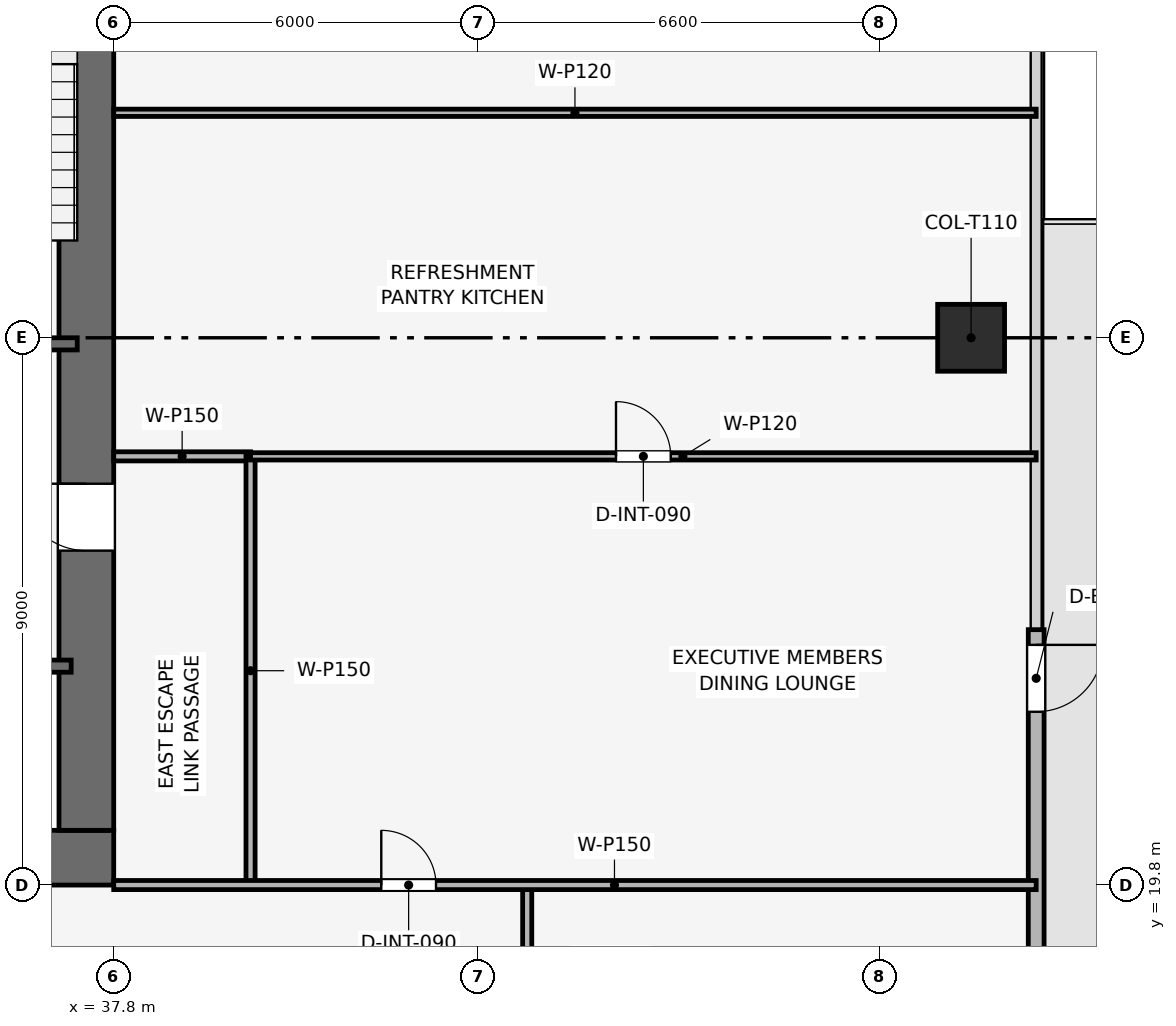
"""IFC4 building model, lengths in metres.
Left out: names, types, materials, properties, quantities, classifications, styles, units other than length and angle.
Written with IfcOpenShell. Run it as: python <this file> out.ifc"""

import sys

from ifc_helpers import new_model, si_unit, direction, frame, frame_2d, origin, origin_2d, place, context, subcontext, project, spatial, rectangle, extrude, element, fill, save


model = new_model("IFC4")
c1 = context("Model", 3, precision=1e-05, world=origin(), true_north=direction((0.0, 1.0)))
c2 = subcontext(c1, "Body", "Model", "MODEL_VIEW")
j1 = project(units=[si_unit("LENGTHUNIT", "METRE"), si_unit("PLANEANGLEUNIT", "RADIAN")], contexts=[c1])
p1 = place(None, origin())
s1 = spatial("IfcSite", under=j1, at=p1, CompositionType="ELEMENT")
p2 = place(p1, origin())
s2 = spatial("IfcBuilding", under=s1, at=p2, CompositionType="ELEMENT")
p3 = place(p2, frame((0.0, 0.0, 149.55)))
s3 = spatial("IfcBuildingStorey", under=s2, at=p3, CompositionType="ELEMENT", Elevation=149.55)
p4 = place(p3, frame((19.8, 20.25, 0.0), z_axis=(0.0, 0.0, 1.0), x_axis=(1.0, 0.0, 0.0)))
e1 = element("IfcWall", 1, at=p4, inside=s3, PredefinedType="SHEAR", context=c2, shape_type="SweptSolid", body=[
    extrude(rectangle(XDim=18.0, YDim=0.9, at=frame_2d((9.0, 0.0))), origin(), (0.0, 0.0, 1.0), 3.75),
])
p5 = place(p4, frame((8.4, 0.0, 0.0)))
e2 = element("IfcOpeningElement", 2, at=p5, cuts=e1, PredefinedType="OPENING", context=c2, shape_type="SweptSolid", body=[
    extrude(rectangle(XDim=1.2, YDim=2.2, at=frame_2d((0.6, 1.1))), frame((0.0, 0.46, 0.0), z_axis=(0.0, -1.0, 0.0), x_axis=(1.0, 0.0, 0.0)), (0.0, 0.0, 1.0), 0.92),
])
p6 = place(p3, frame((37.35, 20.7, 0.0), z_axis=(0.0, 0.0, 1.0), x_axis=(0.0, 1.0, 0.0)))
e3 = element("IfcWall", 3, at=p6, inside=s3, PredefinedType="SHEAR", context=c2, shape_type="SweptSolid", body=[
    extrude(rectangle(XDim=16.2, YDim=0.9, at=frame_2d((8.1, 0.0))), origin(), (0.0, 0.0, 1.0), 3.75),
])
p7 = place(p6, frame((4.6, 0.0, 0.0)))
e4 = element("IfcOpeningElement", 4, at=p7, cuts=e3, PredefinedType="OPENING", context=c2, shape_type="SweptSolid", body=[
    extrude(rectangle(XDim=1.1, YDim=2.15, at=frame_2d((0.55, 1.075))), frame((0.0, 0.46, 0.0), z_axis=(0.0, -1.0, 0.0), x_axis=(1.0, 0.0, 0.0)), (0.0, 0.0, 1.0), 0.92),
])
p8 = place(p3, frame((51.9, 28.8, 0.003), z_axis=(0.0, 0.0, 1.0), x_axis=(1.0, 0.0, 0.0)))
e5 = element("IfcColumn", 5, at=p8, inside=s3, PredefinedType="COLUMN", context=c2, shape_type="SweptSolid", body=[
    extrude(rectangle(XDim=1.1, YDim=1.1, at=origin_2d()), origin(), (0.0, 0.0, 1.0), 3.489),
])
p9 = place(p3, frame((52.97, 24.0, 0.0), z_axis=(0.0, 0.0, 1.0), x_axis=(0.0, -1.0, 0.0)))
e6 = element("IfcWall", 6, at=p9, inside=s3, PredefinedType="SOLIDWALL", context=c2, shape_type="SweptSolid", body=[
    extrude(rectangle(XDim=12.6, YDim=0.26, at=frame_2d((6.3, 0.0))), origin(), (0.0, 0.0, 1.0), 3.495),
])
p10 = place(p9, frame((0.25, 0.0, 0.0)))
e7 = element("IfcOpeningElement", 7, at=p10, cuts=e6, PredefinedType="OPENING", context=c2, shape_type="SweptSolid", body=[
    extrude(rectangle(XDim=1.1, YDim=2.2, at=frame_2d((0.55, 1.1))), frame((0.0, 0.14, 0.0), z_axis=(0.0, -1.0, 0.0), x_axis=(1.0, 0.0, 0.0)), (0.0, 0.0, 1.0), 0.28),
])
p11 = place(p3, frame((34.05, 28.7, 0.0), z_axis=(0.0, 0.0, 1.0), x_axis=(1.0, 0.0, 0.0)))
e8 = element("IfcWall", 8, at=p11, inside=s3, PredefinedType="SHEAR", context=c2, shape_type="SweptSolid", body=[
    extrude(rectangle(XDim=3.15, YDim=0.2, at=frame_2d((1.575, 0.0))), origin(), (0.0, 0.0, 1.0), 3.495),
])
p12 = place(p11, frame((0.8, 0.0, 0.0)))
e9 = element("IfcOpeningElement", 9, at=p12, cuts=e8, PredefinedType="OPENING", context=c2, shape_type="SweptSolid", body=[
    extrude(rectangle(XDim=1.0, YDim=2.1, at=frame_2d((0.5, 1.05))), frame((0.0, 0.11, 0.0), z_axis=(0.0, -1.0, 0.0), x_axis=(1.0, 0.0, 0.0)), (0.0, 0.0, 1.0), 0.22),
])
p13 = place(p3, frame((34.05, 23.4, 0.0), z_axis=(0.0, 0.0, 1.0), x_axis=(1.0, 0.0, 0.0)))
e10 = element("IfcWall", 10, at=p13, inside=s3, PredefinedType="SHEAR", context=c2, shape_type="SweptSolid", body=[
    extrude(rectangle(XDim=3.05, YDim=0.2, at=frame_2d((1.525, 0.0))), origin(), (0.0, 0.0, 1.0), 3.495),
])
p14 = place(p13, frame((1.2, 0.0, 0.0)))
e11 = element("IfcOpeningElement", 11, at=p14, cuts=e10, PredefinedType="OPENING", context=c2, shape_type="SweptSolid", body=[
    extrude(rectangle(XDim=1.1, YDim=2.15, at=frame_2d((0.55, 1.075))), frame((0.0, 0.11, 0.0), z_axis=(0.0, -1.0, 0.0), x_axis=(1.0, 0.0, 0.0)), (0.0, 0.0, 1.0), 0.22),
])
p15 = place(p3, frame((37.8, 26.85, 0.0), z_axis=(0.0, 0.0, 1.0), x_axis=(1.0, 0.0, 0.0)))
e12 = element("IfcWall", 12, at=p15, inside=s3, PredefinedType="PARTITIONING", context=c2, shape_type="SweptSolid", body=[
    extrude(rectangle(XDim=2.25, YDim=0.15, at=frame_2d((1.125, 0.0))), origin(), (0.0, 0.0, 1.0), 3.495),
])
p16 = place(p3, frame((40.05, 19.8, 0.0), z_axis=(0.0, 0.0, 1.0), x_axis=(0.0, 1.0, 0.0)))
e13 = element("IfcWall", 13, at=p16, inside=s3, PredefinedType="PARTITIONING", context=c2, shape_type="SweptSolid", body=[
    extrude(rectangle(XDim=7.05, YDim=0.15, at=frame_2d((3.525, 0.0))), origin(), (0.0, 0.0, 1.0), 3.03),
])
p17 = place(p3, frame((40.05, 26.85, 0.0), z_axis=(0.0, 0.0, 1.0), x_axis=(1.0, 0.0, 0.0)))
e14 = element("IfcWall", 14, at=p17, inside=s3, PredefinedType="PARTITIONING", context=c2, shape_type="SweptSolid", body=[
    extrude(rectangle(XDim=12.92, YDim=0.12, at=frame_2d((6.46, 0.0))), origin(), (0.0, 0.0, 1.0), 2.98),
])
p18 = place(p17, frame((6.01, 0.0, 0.0)))
e15 = element("IfcOpeningElement", 15, at=p18, cuts=e14, PredefinedType="OPENING", context=c2, shape_type="SweptSolid", body=[
    extrude(rectangle(XDim=0.9, YDim=2.1, at=frame_2d((0.45, 1.05))), frame((0.0, 0.07, 0.0), z_axis=(0.0, -1.0, 0.0), x_axis=(1.0, 0.0, 0.0)), (0.0, 0.0, 1.0), 0.14),
])
p19 = place(p3, frame((37.8, 32.5, 0.0), z_axis=(0.0, 0.0, 1.0), x_axis=(1.0, 0.0, 0.0)))
e16 = element("IfcWall", 16, at=p19, inside=s3, PredefinedType="PARTITIONING", context=c2, shape_type="SweptSolid", body=[
    extrude(rectangle(XDim=15.17, YDim=0.12, at=frame_2d((7.585, 0.0))), origin(), (0.0, 0.0, 1.0), 2.98),
])
p20 = place(p3, frame((44.6, 17.4, 0.0), z_axis=(0.0, 0.0, 1.0), x_axis=(0.0, 1.0, 0.0)))
e17 = element("IfcWall", 17, at=p20, inside=s3, PredefinedType="PARTITIONING", context=c2, shape_type="SweptSolid", body=[
    extrude(rectangle(XDim=2.4, YDim=0.15, at=frame_2d((1.2, 0.0))), origin(), (0.0, 0.0, 1.0), 3.495),
])
p21 = place(p3, frame((37.8, 19.8, 0.0), z_axis=(0.0, 0.0, 1.0), x_axis=(1.0, 0.0, 0.0)))
e18 = element("IfcWall", 18, at=p21, inside=s3, PredefinedType="PARTITIONING", context=c2, shape_type="SweptSolid", body=[
    extrude(rectangle(XDim=15.17, YDim=0.15, at=frame_2d((7.585, 0.0))), origin(), (0.0, 0.0, 1.0), 2.98),
])
p22 = place(p21, frame((4.4, 0.0, 0.0)))
e19 = element("IfcOpeningElement", 19, at=p22, cuts=e18, PredefinedType="OPENING", context=c2, shape_type="SweptSolid", body=[
    extrude(rectangle(XDim=0.9, YDim=2.1, at=frame_2d((0.45, 1.05))), frame((0.0, 0.085, 0.0), z_axis=(0.0, -1.0, 0.0), x_axis=(1.0, 0.0, 0.0)), (0.0, 0.0, 1.0), 0.17),
])
p23 = place(p10, origin())
e20 = element("IfcDoor", 20, at=p23, inside=s3, OperationType="SINGLE_SWING_LEFT", PredefinedType="DOOR", context=c2, shape_type="SweptSolid", body=[
    extrude(rectangle(XDim=1.1, YDim=2.2, at=frame_2d((0.55, 1.1))), frame((0.0, 0.025, 0.0), z_axis=(0.0, -1.0, 0.0), x_axis=(1.0, 0.0, 0.0)), (0.0, 0.0, 1.0), 0.05),
])
fill(e7, e20)
p24 = place(p18, origin())
e21 = element("IfcDoor", 21, at=p24, inside=s3, OperationType="SINGLE_SWING_LEFT", PredefinedType="DOOR", context=c2, shape_type="SweptSolid", body=[
    extrude(rectangle(XDim=0.9, YDim=2.1, at=frame_2d((0.45, 1.05))), frame((0.0, 0.025, 0.0), z_axis=(0.0, -1.0, 0.0), x_axis=(1.0, 0.0, 0.0)), (0.0, 0.0, 1.0), 0.05),
])
fill(e15, e21)
p25 = place(p22, origin())
e22 = element("IfcDoor", 22, at=p25, inside=s3, OperationType="SINGLE_SWING_LEFT", PredefinedType="DOOR", context=c2, shape_type="SweptSolid", body=[
    extrude(rectangle(XDim=0.9, YDim=2.1, at=frame_2d((0.45, 1.05))), frame((0.0, 0.025, 0.0), z_axis=(0.0, -1.0, 0.0), x_axis=(1.0, 0.0, 0.0)), (0.0, 0.0, 1.0), 0.05),
])
fill(e19, e22)
p26 = place(p7, origin())
e23 = element("IfcDoor", 23, at=p26, inside=s3, OperationType="SINGLE_SWING_RIGHT", PredefinedType="DOOR", context=c2, shape_type="SweptSolid", body=[
    extrude(rectangle(XDim=1.1, YDim=2.15, at=frame_2d((0.55, 1.075))), frame((0.0, 0.025, 0.0), z_axis=(0.0, -1.0, 0.0), x_axis=(1.0, 0.0, 0.0)), (0.0, 0.0, 1.0), 0.05),
])
fill(e4, e23)
save(model, sys.argv[1])
